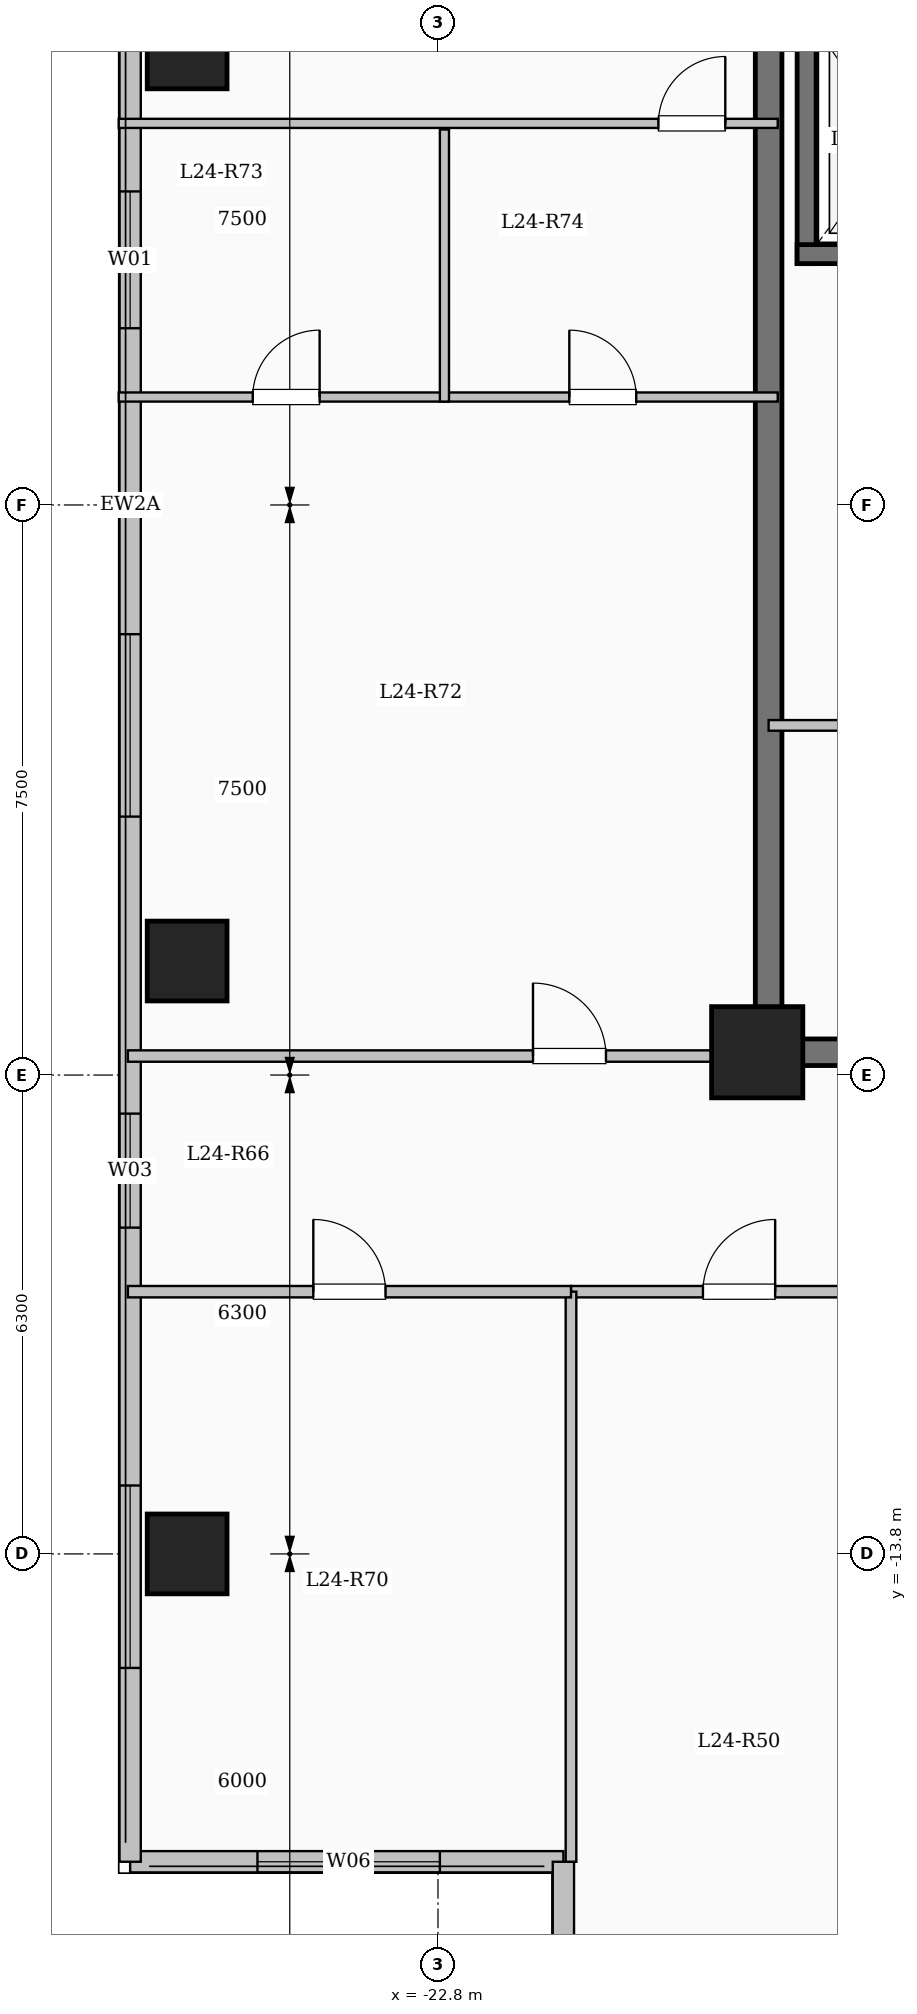
"""IFC4 building model, lengths in metres.
Left out: names, types, materials, properties, quantities, classifications, styles, units other than length and angle.
Written with IfcOpenShell. Run it as: python <this file> out.ifc"""

import sys

from ifc_helpers import new_model, si_unit, direction, frame, frame_2d, origin, origin_2d, place, context, subcontext, project, spatial, rectangle, extrude, element, fill, save


model = new_model("IFC4")
c1 = context("Model", 3, precision=1e-05, world=origin(), true_north=direction((0.0, 1.0)))
c2 = subcontext(c1, "Body", "Model", "MODEL_VIEW")
j1 = project(units=[si_unit("LENGTHUNIT", "METRE"), si_unit("PLANEANGLEUNIT", "RADIAN")], contexts=[c1])
p1 = place(None, origin())
s1 = spatial("IfcSite", under=j1, at=p1, CompositionType="ELEMENT")
p2 = place(p1, origin())
s2 = spatial("IfcBuilding", under=s1, at=p2, CompositionType="ELEMENT")
p3 = place(p2, frame((0.0, 0.0, 91.7)))
s3 = spatial("IfcBuildingStorey", under=s2, at=p3, CompositionType="ELEMENT", Elevation=91.7)
p4 = place(p3, frame((-18.6, -7.2, 0.0), z_axis=(0.0, 0.0, 1.0), x_axis=(1.0, 0.0, 0.0)))
e1 = element("IfcColumn", 1, at=p4, inside=s3, PredefinedType="COLUMN", context=c2, shape_type="SweptSolid", body=[
    extrude(rectangle(XDim=1.2, YDim=1.2, at=origin_2d()), origin(), (0.0, 0.0, 1.0), 3.35),
])
for number, where, z_axis, x_axis in (
    (2, (-26.1, -13.8, 0.0), (0.0, 0.0, 1.0), (1.0, 0.0, 0.0)),
    (3, (-26.1, -6.0, 0.0), (0.0, 0.0, 1.0), (1.0, 0.0, 0.0)),
    (4, (-26.1, 6.0, 0.0), (0.0, 0.0, 1.0), (1.0, 0.0, 0.0)),
):
    element("IfcColumn", number, at=place(p3, frame(where, z_axis=z_axis, x_axis=x_axis)), inside=s3, PredefinedType="COLUMN", context=c2, shape_type="SweptSolid", body=[
        extrude(rectangle(XDim=1.05, YDim=1.05, at=origin_2d()), origin(), (0.0, 0.0, 1.0), 3.35),
    ])
p5 = place(p3, frame((-21.15, -17.85, 0.0), z_axis=(0.0, 0.0, 1.0), x_axis=(-1.0, 0.0, 0.0)))
e5 = element("IfcWall", 5, at=p5, inside=s3, PredefinedType="SOLIDWALL", context=c2, shape_type="SweptSolid", body=[
    extrude(rectangle(XDim=5.7, YDim=0.28, at=frame_2d((2.85, 0.0))), origin(), (0.0, 0.0, 1.0), 3.1),
])
p6 = place(p5, frame((1.625, 0.0, 0.9)))
e6 = element("IfcOpeningElement", 6, at=p6, cuts=e5, PredefinedType="OPENING", context=c2, shape_type="SweptSolid", body=[
    extrude(rectangle(XDim=2.4, YDim=1.8, at=frame_2d((1.2, 0.9))), frame((0.0, 0.15, 0.0), z_axis=(0.0, -1.0, 0.0), x_axis=(1.0, 0.0, 0.0)), (0.0, 0.0, 1.0), 0.3),
])
p7 = place(p3, frame((-26.85, -17.85, 0.0), z_axis=(0.0, 0.0, 1.0), x_axis=(0.0, 1.0, 0.0)))
e7 = element("IfcWall", 7, at=p7, inside=s3, PredefinedType="SOLIDWALL", context=c2, shape_type="SweptSolid", body=[
    extrude(rectangle(XDim=35.7, YDim=0.28, at=frame_2d((17.85, 0.0))), origin(), (0.0, 0.0, 1.0), 3.1),
])
p8 = place(p7, frame((2.55, 0.0, 0.9)))
e8 = element("IfcOpeningElement", 8, at=p8, cuts=e7, PredefinedType="OPENING", context=c2, shape_type="SweptSolid", body=[
    extrude(rectangle(XDim=2.4, YDim=1.8, at=frame_2d((1.2, 0.9))), frame((0.0, 0.15, 0.0), z_axis=(0.0, -1.0, 0.0), x_axis=(1.0, 0.0, 0.0)), (0.0, 0.0, 1.0), 0.3),
])
p9 = place(p7, frame((8.343, 0.0, 0.9)))
e9 = element("IfcOpeningElement", 9, at=p9, cuts=e7, PredefinedType="OPENING", context=c2, shape_type="SweptSolid", body=[
    extrude(rectangle(XDim=1.5, YDim=1.65, at=frame_2d((0.75, 0.825))), frame((0.0, 0.15, 0.0), z_axis=(0.0, -1.0, 0.0), x_axis=(1.0, 0.0, 0.0)), (0.0, 0.0, 1.0), 0.3),
])
p10 = place(p7, frame((13.75, 0.0, 0.9)))
e10 = element("IfcOpeningElement", 10, at=p10, cuts=e7, PredefinedType="OPENING", context=c2, shape_type="SweptSolid", body=[
    extrude(rectangle(XDim=2.4, YDim=1.8, at=frame_2d((1.2, 0.9))), frame((0.0, 0.15, 0.0), z_axis=(0.0, -1.0, 0.0), x_axis=(1.0, 0.0, 0.0)), (0.0, 0.0, 1.0), 0.3),
])
p11 = place(p7, frame((20.175, 0.0, 0.9)))
e11 = element("IfcOpeningElement", 11, at=p11, cuts=e7, PredefinedType="OPENING", context=c2, shape_type="SweptSolid", body=[
    extrude(rectangle(XDim=1.8, YDim=1.65, at=frame_2d((0.9, 0.825))), frame((0.0, 0.15, 0.0), z_axis=(0.0, -1.0, 0.0), x_axis=(1.0, 0.0, 0.0)), (0.0, 0.0, 1.0), 0.3),
])
p12 = place(p7, frame((24.725, 0.0, 0.9)))
e12 = element("IfcOpeningElement", 12, at=p12, cuts=e7, PredefinedType="OPENING", context=c2, shape_type="SweptSolid", body=[
    extrude(rectangle(XDim=2.0, YDim=1.7, at=frame_2d((1.0, 0.85))), frame((0.0, 0.15, 0.0), z_axis=(0.0, -1.0, 0.0), x_axis=(1.0, 0.0, 0.0)), (0.0, 0.0, 1.0), 0.3),
])
p13 = place(p7, frame((28.975, 0.0, 0.95)))
e13 = element("IfcOpeningElement", 13, at=p13, cuts=e7, PredefinedType="OPENING", context=c2, shape_type="SweptSolid", body=[
    extrude(rectangle(XDim=1.0, YDim=1.5, at=frame_2d((0.5, 0.75))), frame((0.0, 0.15, 0.0), z_axis=(0.0, -1.0, 0.0), x_axis=(1.0, 0.0, 0.0)), (0.0, 0.0, 1.0), 0.3),
])
p14 = place(p7, frame((32.025, 0.0, 0.9)))
e14 = element("IfcOpeningElement", 14, at=p14, cuts=e7, PredefinedType="OPENING", context=c2, shape_type="SweptSolid", body=[
    extrude(rectangle(XDim=2.0, YDim=1.7, at=frame_2d((1.0, 0.85))), frame((0.0, 0.15, 0.0), z_axis=(0.0, -1.0, 0.0), x_axis=(1.0, 0.0, 0.0)), (0.0, 0.0, 1.0), 0.3),
])
p15 = place(p3, frame((-21.15, -22.05, 0.0), z_axis=(0.0, 0.0, 1.0), x_axis=(0.0, 1.0, 0.0)))
e15 = element("IfcWall", 15, at=p15, inside=s3, PredefinedType="SOLIDWALL", context=c2, shape_type="SweptSolid", body=[
    extrude(rectangle(XDim=4.2, YDim=0.28, at=frame_2d((2.1, 0.0))), origin(), (0.0, 0.0, 1.0), 3.1),
])
p16 = place(p15, frame((1.118, 0.0, 0.9)))
e16 = element("IfcOpeningElement", 16, at=p16, cuts=e15, PredefinedType="OPENING", context=c2, shape_type="SweptSolid", body=[
    extrude(rectangle(XDim=2.0, YDim=1.7, at=frame_2d((1.0, 0.85))), frame((0.0, 0.15, 0.0), z_axis=(0.0, -1.0, 0.0), x_axis=(1.0, 0.0, 0.0)), (0.0, 0.0, 1.0), 0.3),
])
p17 = place(p3, frame((-17.95, 3.175, 0.0), z_axis=(0.0, 0.0, 1.0), x_axis=(0.0, 1.0, 0.0)))
e17 = element("IfcWall", 17, at=p17, inside=s3, PredefinedType="SHEAR", context=c2, shape_type="SweptSolid", body=[
    extrude(rectangle(XDim=3.25, YDim=0.25, at=frame_2d((1.625, 0.0))), origin(), (0.0, 0.0, 1.0), 3.35),
])
p18 = place(p3, frame((-18.075, 3.3, 0.0), z_axis=(0.0, 0.0, 1.0), x_axis=(1.0, 0.0, 0.0)))
e18 = element("IfcWall", 18, at=p18, inside=s3, PredefinedType="SHEAR", context=c2, shape_type="SweptSolid", body=[
    extrude(rectangle(XDim=2.55, YDim=0.25, at=frame_2d((1.275, 0.0))), origin(), (0.0, 0.0, 1.0), 3.35),
])
p19 = place(p3, frame((-18.45, -7.375, 0.0), z_axis=(0.0, 0.0, 1.0), x_axis=(0.0, 1.0, 0.0)))
e19 = element("IfcWall", 19, at=p19, inside=s3, PredefinedType="SHEAR", context=c2, shape_type="SweptSolid", body=[
    extrude(rectangle(XDim=14.05, YDim=0.35, at=frame_2d((7.025, 0.0))), origin(), (0.0, 0.0, 1.0), 3.35),
])
p20 = place(p3, frame((-18.625, -7.2, 0.0), z_axis=(0.0, 0.0, 1.0), x_axis=(1.0, 0.0, 0.0)))
e20 = element("IfcWall", 20, at=p20, inside=s3, PredefinedType="SHEAR", context=c2, shape_type="SweptSolid", body=[
    extrude(rectangle(XDim=8.55, YDim=0.35, at=frame_2d((4.275, 0.0))), origin(), (0.0, 0.0, 1.0), 3.35),
])
p21 = place(p3, frame((-18.45, -2.9, 0.0), z_axis=(0.0, 0.0, 1.0), x_axis=(1.0, 0.0, 0.0)))
e21 = element("IfcWall", 21, at=p21, inside=s3, PredefinedType="PARTITIONING", context=c2, shape_type="SweptSolid", body=[
    extrude(rectangle(XDim=3.05, YDim=0.14, at=frame_2d((1.525, 0.0))), origin(), (0.0, 0.0, 1.0), 3.1),
])
p22 = place(p21, frame((1.05, 0.0, 0.0)))
e22 = element("IfcOpeningElement", 22, at=p22, cuts=e21, PredefinedType="OPENING", context=c2, shape_type="SweptSolid", body=[
    extrude(rectangle(XDim=0.9, YDim=2.08, at=frame_2d((0.45, 1.04))), frame((0.0, 0.08, 0.0), z_axis=(0.0, -1.0, 0.0), x_axis=(1.0, 0.0, 0.0)), (0.0, 0.0, 1.0), 0.16),
])
p23 = place(p3, frame((-21.05, -10.35, 0.0), z_axis=(0.0, 0.0, 1.0), x_axis=(1.0, 0.0, 0.0)))
e23 = element("IfcWall", 23, at=p23, inside=s3, PredefinedType="PARTITIONING", context=c2, shape_type="SweptSolid", body=[
    extrude(rectangle(XDim=12.5, YDim=0.15, at=frame_2d((6.25, 0.0))), origin(), (0.0, 0.0, 1.0), 3.1),
])
p24 = place(p23, frame((1.736, 0.0, 0.0)))
e24 = element("IfcOpeningElement", 24, at=p24, cuts=e23, PredefinedType="OPENING", context=c2, shape_type="SweptSolid", body=[
    extrude(rectangle(XDim=0.95, YDim=2.15, at=frame_2d((0.475, 1.075))), frame((0.0, 0.085, 0.0), z_axis=(0.0, -1.0, 0.0), x_axis=(1.0, 0.0, 0.0)), (0.0, 0.0, 1.0), 0.17),
])
p25 = place(p23, frame((6.248, 0.0, 0.0)))
e25 = element("IfcOpeningElement", 25, at=p25, cuts=e23, PredefinedType="OPENING", context=c2, shape_type="SweptSolid", body=[
    extrude(rectangle(XDim=0.95, YDim=2.15, at=frame_2d((0.475, 1.075))), frame((0.0, 0.085, 0.0), z_axis=(0.0, -1.0, 0.0), x_axis=(1.0, 0.0, 0.0)), (0.0, 0.0, 1.0), 0.17),
])
p26 = place(p23, frame((10.262, 0.0, 0.0)))
e26 = element("IfcOpeningElement", 26, at=p26, cuts=e23, PredefinedType="OPENING", context=c2, shape_type="SweptSolid", body=[
    extrude(rectangle(XDim=0.95, YDim=2.15, at=frame_2d((0.475, 1.075))), frame((0.0, 0.085, 0.0), z_axis=(0.0, -1.0, 0.0), x_axis=(1.0, 0.0, 0.0)), (0.0, 0.0, 1.0), 0.17),
])
p27 = place(p3, frame((-26.88, -7.25, 0.0), z_axis=(0.0, 0.0, 1.0), x_axis=(1.0, 0.0, 0.0)))
e27 = element("IfcWall", 27, at=p27, inside=s3, PredefinedType="PARTITIONING", context=c2, shape_type="SweptSolid", body=[
    extrude(rectangle(XDim=8.43, YDim=0.15, at=frame_2d((4.215, 0.0))), origin(), (0.0, 0.0, 1.0), 3.1),
])
p28 = place(p27, frame((5.33, 0.0, 0.0)))
e28 = element("IfcOpeningElement", 28, at=p28, cuts=e27, PredefinedType="OPENING", context=c2, shape_type="SweptSolid", body=[
    extrude(rectangle(XDim=0.96, YDim=2.15, at=frame_2d((0.48, 1.075))), frame((0.0, 0.085, 0.0), z_axis=(0.0, -1.0, 0.0), x_axis=(1.0, 0.0, 0.0)), (0.0, 0.0, 1.0), 0.17),
])
p29 = place(p3, frame((-21.05, -17.85, 0.0), z_axis=(0.0, 0.0, 1.0), x_axis=(0.0, 1.0, 0.0)))
e29 = element("IfcWall", 29, at=p29, inside=s3, PredefinedType="PARTITIONING", context=c2, shape_type="SweptSolid", body=[
    extrude(rectangle(XDim=7.5, YDim=0.14, at=frame_2d((3.75, 0.0))), origin(), (0.0, 0.0, 1.0), 3.1),
])
p30 = place(p3, frame((-26.88, -10.35, 0.0), z_axis=(0.0, 0.0, 1.0), x_axis=(1.0, 0.0, 0.0)))
e30 = element("IfcWall", 30, at=p30, inside=s3, PredefinedType="PARTITIONING", context=c2, shape_type="SweptSolid", body=[
    extrude(rectangle(XDim=5.83, YDim=0.15, at=frame_2d((2.915, 0.0))), origin(), (0.0, 0.0, 1.0), 3.1),
])
p31 = place(p30, frame((2.44, 0.0, 0.0)))
e31 = element("IfcOpeningElement", 31, at=p31, cuts=e30, PredefinedType="OPENING", context=c2, shape_type="SweptSolid", body=[
    extrude(rectangle(XDim=0.95, YDim=2.15, at=frame_2d((0.475, 1.075))), frame((0.0, 0.085, 0.0), z_axis=(0.0, -1.0, 0.0), x_axis=(1.0, 0.0, 0.0)), (0.0, 0.0, 1.0), 0.17),
])
p32 = place(p3, frame((-27.0, 1.42, 0.0), z_axis=(0.0, 0.0, 1.0), x_axis=(1.0, 0.0, 0.0)))
e32 = element("IfcWall", 32, at=p32, inside=s3, PredefinedType="PARTITIONING", context=c2, shape_type="SweptSolid", body=[
    extrude(rectangle(XDim=8.67, YDim=0.12, at=frame_2d((4.335, 0.0))), origin(), (0.0, 0.0, 1.0), 3.1),
])
p33 = place(p32, frame((1.763, 0.0, 0.0)))
e33 = element("IfcOpeningElement", 33, at=p33, cuts=e32, PredefinedType="OPENING", context=c2, shape_type="SweptSolid", body=[
    extrude(rectangle(XDim=0.88, YDim=2.1, at=frame_2d((0.44, 1.05))), frame((0.0, 0.07, 0.0), z_axis=(0.0, -1.0, 0.0), x_axis=(1.0, 0.0, 0.0)), (0.0, 0.0, 1.0), 0.14),
])
p34 = place(p32, frame((5.928, 0.0, 0.0)))
e34 = element("IfcOpeningElement", 34, at=p34, cuts=e32, PredefinedType="OPENING", context=c2, shape_type="SweptSolid", body=[
    extrude(rectangle(XDim=0.88, YDim=2.1, at=frame_2d((0.44, 1.05))), frame((0.0, 0.07, 0.0), z_axis=(0.0, -1.0, 0.0), x_axis=(1.0, 0.0, 0.0)), (0.0, 0.0, 1.0), 0.14),
])
p35 = place(p3, frame((-27.0, 5.02, 0.0), z_axis=(0.0, 0.0, 1.0), x_axis=(1.0, 0.0, 0.0)))
e35 = element("IfcWall", 35, at=p35, inside=s3, PredefinedType="PARTITIONING", context=c2, shape_type="SweptSolid", body=[
    extrude(rectangle(XDim=8.67, YDim=0.12, at=frame_2d((4.335, 0.0))), origin(), (0.0, 0.0, 1.0), 3.1),
])
p36 = place(p35, frame((7.1, 0.0, 0.0)))
e36 = element("IfcOpeningElement", 36, at=p36, cuts=e35, PredefinedType="OPENING", context=c2, shape_type="SweptSolid", body=[
    extrude(rectangle(XDim=0.88, YDim=2.1, at=frame_2d((0.44, 1.05))), frame((0.0, 0.07, 0.0), z_axis=(0.0, -1.0, 0.0), x_axis=(1.0, 0.0, 0.0)), (0.0, 0.0, 1.0), 0.14),
])
p37 = place(p3, frame((-22.715, 1.36, 0.0), z_axis=(0.0, 0.0, 1.0), x_axis=(0.0, 1.0, 0.0)))
e37 = element("IfcWall", 37, at=p37, inside=s3, PredefinedType="PARTITIONING", context=c2, shape_type="SweptSolid", body=[
    extrude(rectangle(XDim=3.58, YDim=0.12, at=frame_2d((1.79, 0.0))), origin(), (0.0, 0.0, 1.0), 3.1),
])
p38 = place(p6, origin())
e38 = element("IfcWindow", 38, at=p38, inside=s3, PartitioningType="SINGLE_PANEL", PredefinedType="WINDOW", context=c2, shape_type="SweptSolid", body=[
    extrude(rectangle(XDim=2.4, YDim=1.8, at=frame_2d((1.2, 0.9))), frame((0.0, 0.03, 0.0), z_axis=(0.0, -1.0, 0.0), x_axis=(1.0, 0.0, 0.0)), (0.0, 0.0, 1.0), 0.06),
])
fill(e6, e38)
p39 = place(p8, origin())
e39 = element("IfcWindow", 39, at=p39, inside=s3, PartitioningType="SINGLE_PANEL", PredefinedType="WINDOW", context=c2, shape_type="SweptSolid", body=[
    extrude(rectangle(XDim=2.4, YDim=1.8, at=frame_2d((1.2, 0.9))), frame((0.0, 0.03, 0.0), z_axis=(0.0, -1.0, 0.0), x_axis=(1.0, 0.0, 0.0)), (0.0, 0.0, 1.0), 0.06),
])
fill(e8, e39)
p40 = place(p9, origin())
e40 = element("IfcWindow", 40, at=p40, inside=s3, PartitioningType="SINGLE_PANEL", PredefinedType="WINDOW", context=c2, shape_type="SweptSolid", body=[
    extrude(rectangle(XDim=1.5, YDim=1.65, at=frame_2d((0.75, 0.825))), frame((0.0, 0.03, 0.0), z_axis=(0.0, -1.0, 0.0), x_axis=(1.0, 0.0, 0.0)), (0.0, 0.0, 1.0), 0.06),
])
fill(e9, e40)
p41 = place(p10, origin())
e41 = element("IfcWindow", 41, at=p41, inside=s3, PartitioningType="SINGLE_PANEL", PredefinedType="WINDOW", context=c2, shape_type="SweptSolid", body=[
    extrude(rectangle(XDim=2.4, YDim=1.8, at=frame_2d((1.2, 0.9))), frame((0.0, 0.03, 0.0), z_axis=(0.0, -1.0, 0.0), x_axis=(1.0, 0.0, 0.0)), (0.0, 0.0, 1.0), 0.06),
])
fill(e10, e41)
p42 = place(p11, origin())
e42 = element("IfcWindow", 42, at=p42, inside=s3, PartitioningType="SINGLE_PANEL", PredefinedType="WINDOW", context=c2, shape_type="SweptSolid", body=[
    extrude(rectangle(XDim=1.8, YDim=1.65, at=frame_2d((0.9, 0.825))), frame((0.0, 0.03, 0.0), z_axis=(0.0, -1.0, 0.0), x_axis=(1.0, 0.0, 0.0)), (0.0, 0.0, 1.0), 0.06),
])
fill(e11, e42)
p43 = place(p24, origin())
e43 = element("IfcDoor", 43, at=p43, inside=s3, OperationType="SINGLE_SWING_RIGHT", PredefinedType="DOOR", context=c2, shape_type="SweptSolid", body=[
    extrude(rectangle(XDim=0.95, YDim=2.15, at=frame_2d((0.475, 1.075))), frame((0.0, 0.025, 0.0), z_axis=(0.0, -1.0, 0.0), x_axis=(1.0, 0.0, 0.0)), (0.0, 0.0, 1.0), 0.05),
])
fill(e24, e43)
p44 = place(p31, origin())
e44 = element("IfcDoor", 44, at=p44, inside=s3, OperationType="SINGLE_SWING_LEFT", PredefinedType="DOOR", context=c2, shape_type="SweptSolid", body=[
    extrude(rectangle(XDim=0.95, YDim=2.15, at=frame_2d((0.475, 1.075))), frame((0.0, 0.025, 0.0), z_axis=(0.0, -1.0, 0.0), x_axis=(1.0, 0.0, 0.0)), (0.0, 0.0, 1.0), 0.05),
])
fill(e31, e44)
p45 = place(p28, origin())
e45 = element("IfcDoor", 45, at=p45, inside=s3, OperationType="SINGLE_SWING_LEFT", PredefinedType="DOOR", context=c2, shape_type="SweptSolid", body=[
    extrude(rectangle(XDim=0.96, YDim=2.15, at=frame_2d((0.48, 1.075))), frame((0.0, 0.025, 0.0), z_axis=(0.0, -1.0, 0.0), x_axis=(1.0, 0.0, 0.0)), (0.0, 0.0, 1.0), 0.05),
])
fill(e28, e45)
p46 = place(p33, origin())
e46 = element("IfcDoor", 46, at=p46, inside=s3, OperationType="SINGLE_SWING_RIGHT", PredefinedType="DOOR", context=c2, shape_type="SweptSolid", body=[
    extrude(rectangle(XDim=0.88, YDim=2.1, at=frame_2d((0.44, 1.05))), frame((0.0, 0.025, 0.0), z_axis=(0.0, -1.0, 0.0), x_axis=(1.0, 0.0, 0.0)), (0.0, 0.0, 1.0), 0.05),
])
fill(e33, e46)
p47 = place(p34, origin())
e47 = element("IfcDoor", 47, at=p47, inside=s3, OperationType="SINGLE_SWING_LEFT", PredefinedType="DOOR", context=c2, shape_type="SweptSolid", body=[
    extrude(rectangle(XDim=0.88, YDim=2.1, at=frame_2d((0.44, 1.05))), frame((0.0, 0.025, 0.0), z_axis=(0.0, -1.0, 0.0), x_axis=(1.0, 0.0, 0.0)), (0.0, 0.0, 1.0), 0.05),
])
fill(e34, e47)
p48 = place(p36, origin())
e48 = element("IfcDoor", 48, at=p48, inside=s3, OperationType="SINGLE_SWING_RIGHT", PredefinedType="DOOR", context=c2, shape_type="SweptSolid", body=[
    extrude(rectangle(XDim=0.88, YDim=2.1, at=frame_2d((0.44, 1.05))), frame((0.0, 0.025, 0.0), z_axis=(0.0, -1.0, 0.0), x_axis=(1.0, 0.0, 0.0)), (0.0, 0.0, 1.0), 0.05),
])
fill(e36, e48)
save(model, sys.argv[1])
